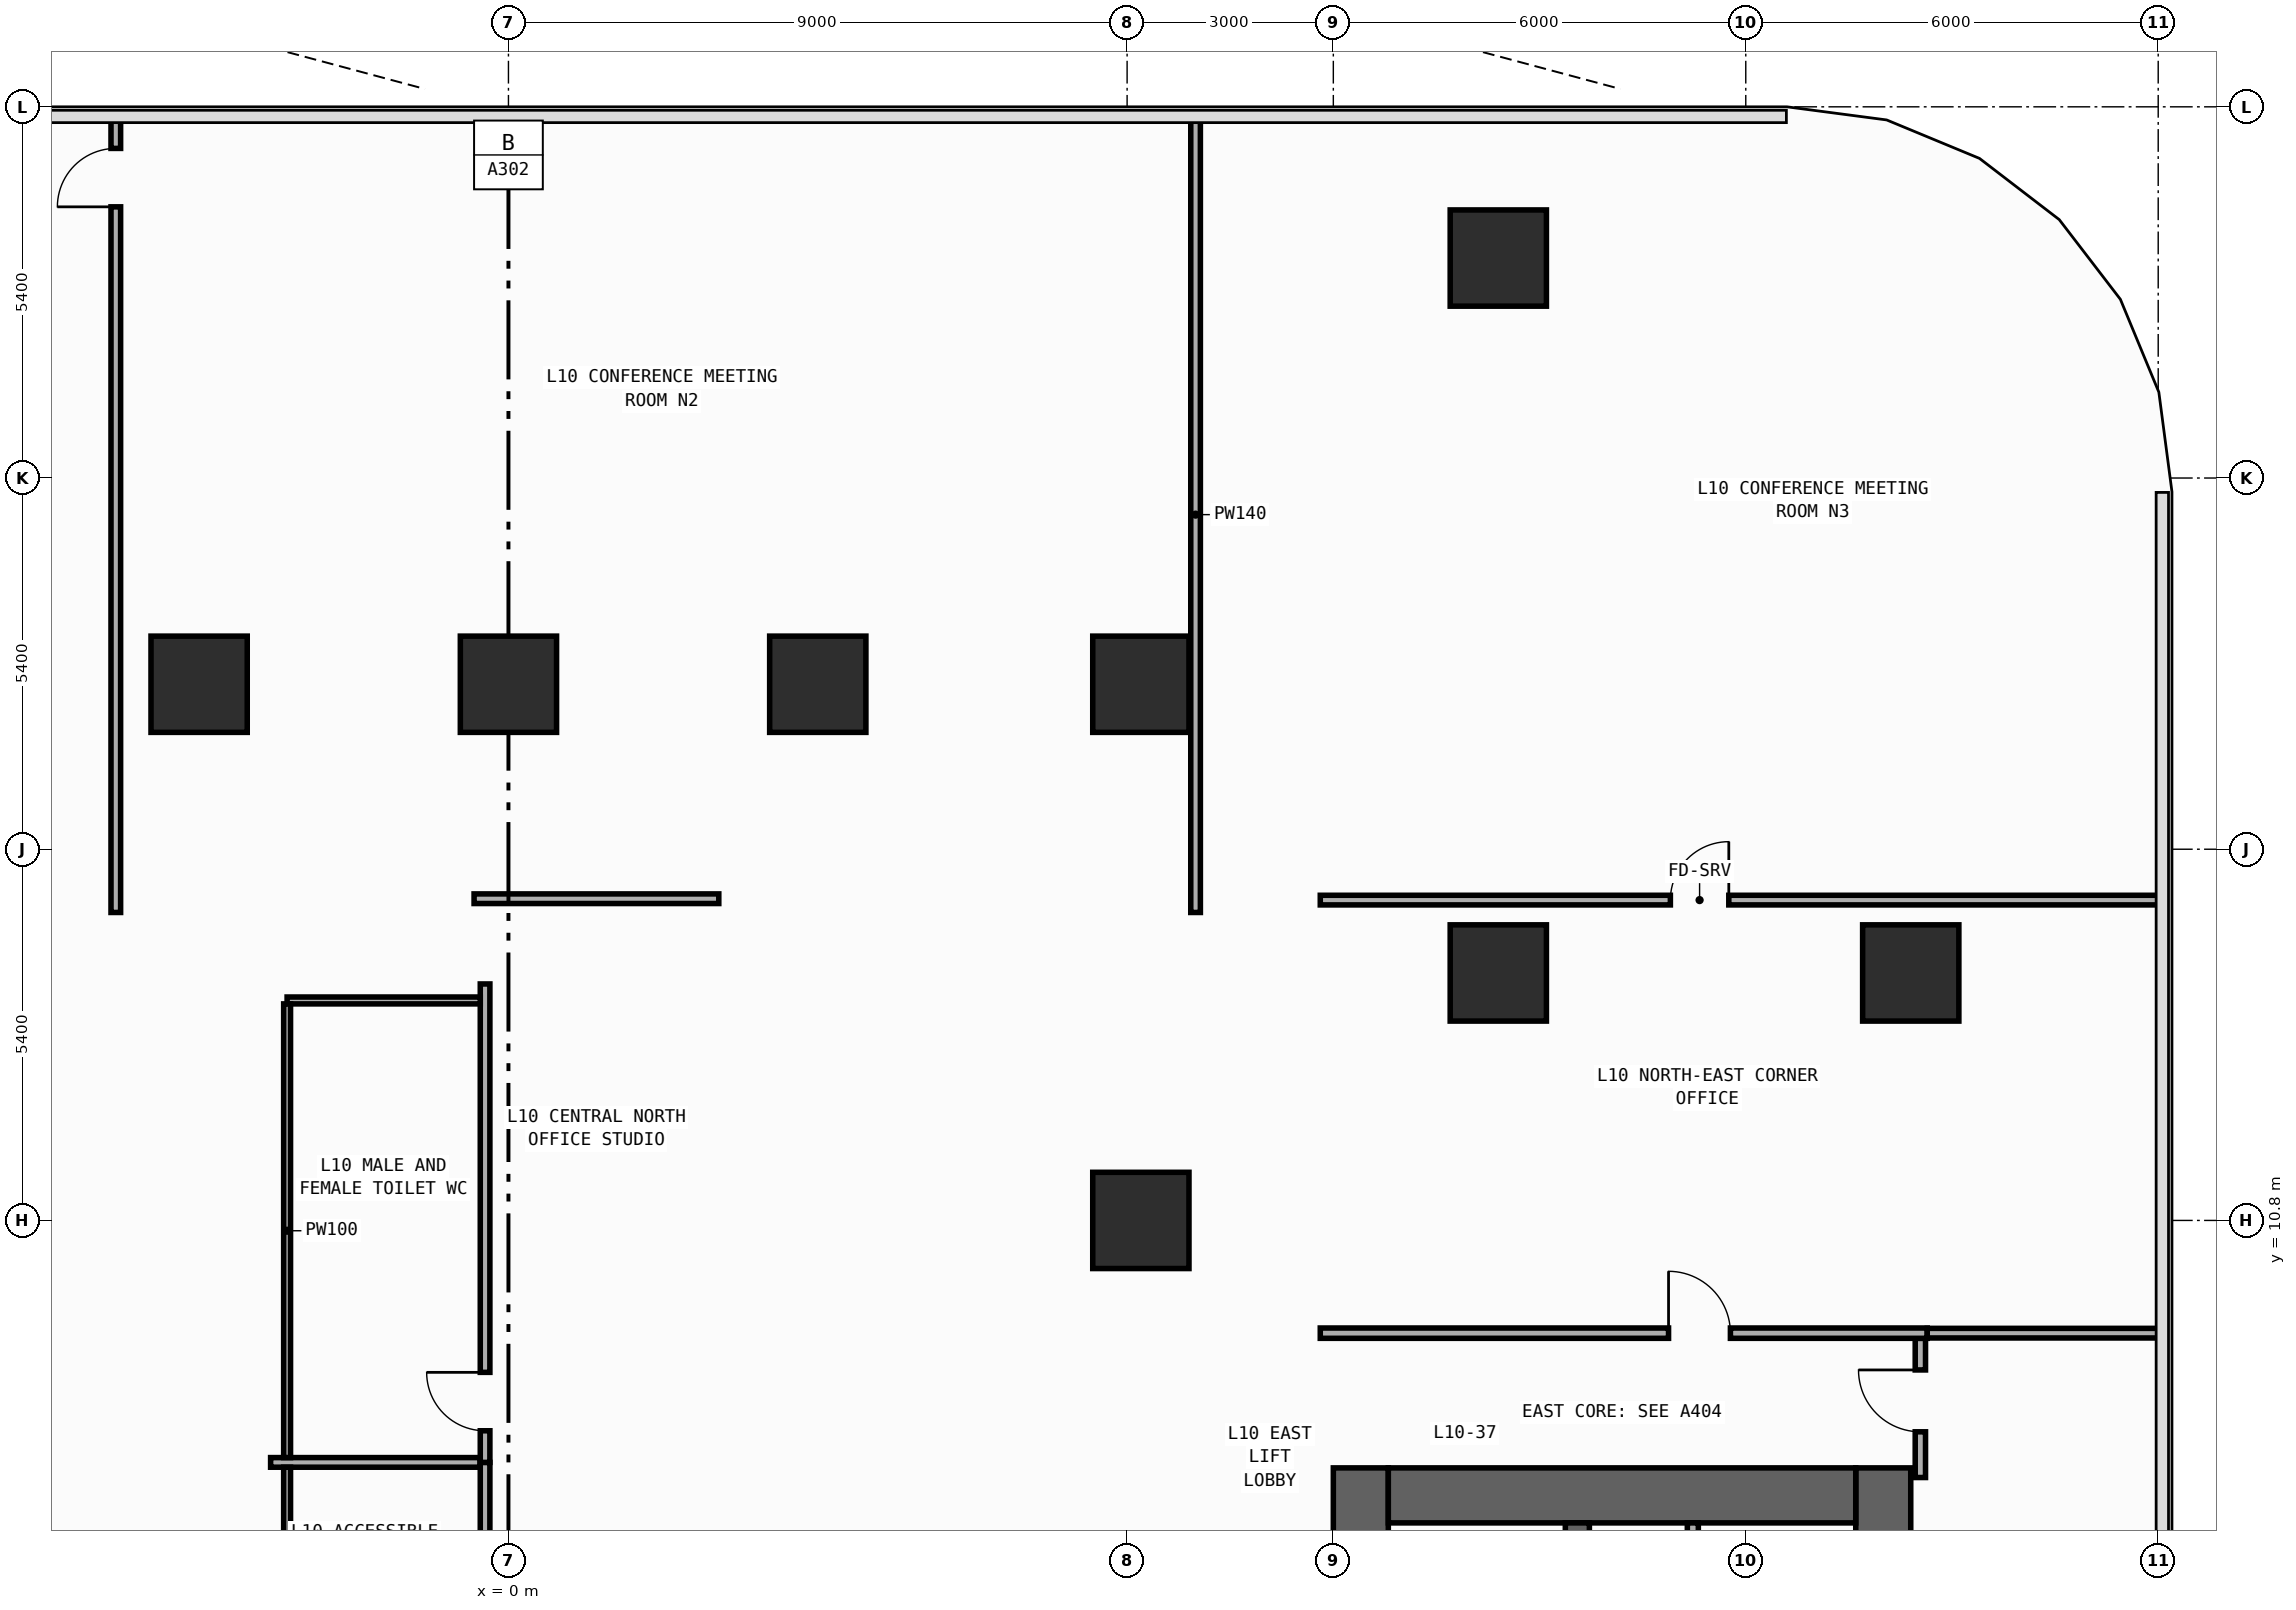
"""IFC4 building model, lengths in metres.
Left out: names, types, materials, properties, quantities, classifications, styles, units other than length and angle.
Written with IfcOpenShell. Run it as: python <this file> out.ifc"""

import sys

from ifc_helpers import new_model, si_unit, direction, frame, frame_2d, origin, origin_2d, place, context, subcontext, project, spatial, rectangle, extrude, element, fill, save


model = new_model("IFC4")
c1 = context("Model", 3, precision=1e-05, world=origin(), true_north=direction((0.0, 1.0)))
c2 = subcontext(c1, "Body", "Model", "MODEL_VIEW")
j1 = project(units=[si_unit("LENGTHUNIT", "METRE"), si_unit("PLANEANGLEUNIT", "RADIAN")], contexts=[c1])
p1 = place(None, origin())
s1 = spatial("IfcSite", under=j1, at=p1, CompositionType="ELEMENT")
p2 = place(p1, origin())
s2 = spatial("IfcBuilding", under=s1, at=p2, CompositionType="ELEMENT")
p3 = place(p2, frame((0.0, 0.0, 42.8)))
s3 = spatial("IfcBuildingStorey", under=s2, at=p3, CompositionType="ELEMENT", Elevation=42.8)
p4 = place(p3, frame((12.4, -19.8, 0.0), z_axis=(0.0, 0.0, 1.0), x_axis=(0.0, 1.0, 0.0)))
e1 = element("IfcWall", 1, at=p4, inside=s3, PredefinedType="SHEAR", context=c2, shape_type="SweptSolid", body=[
    extrude(rectangle(XDim=27.0, YDim=0.8, at=frame_2d((13.5, 0.0))), origin(), (0.0, 0.0, 1.0), 3.94),
])
p5 = place(p4, frame((23.05, 0.0, 0.0)))
e2 = element("IfcOpeningElement", 2, at=p5, cuts=e1, PredefinedType="OPENING", context=c2, shape_type="SweptSolid", body=[
    extrude(rectangle(XDim=1.1, YDim=2.2, at=frame_2d((0.55, 1.1))), frame((0.0, 0.41, 0.0), z_axis=(0.0, -1.0, 0.0), x_axis=(1.0, 0.0, 0.0)), (0.0, 0.0, 1.0), 0.82),
])
p6 = place(p4, frame((19.85, 0.0, 0.0)))
e3 = element("IfcOpeningElement", 3, at=p6, cuts=e1, PredefinedType="OPENING", context=c2, shape_type="SweptSolid", body=[
    extrude(rectangle(XDim=1.1, YDim=2.2, at=frame_2d((0.55, 1.1))), frame((0.0, 0.41, 0.0), z_axis=(0.0, -1.0, 0.0), x_axis=(1.0, 0.0, 0.0)), (0.0, 0.0, 1.0), 0.82),
])
p7 = place(p4, frame((16.65, 0.0, 0.0)))
e4 = element("IfcOpeningElement", 4, at=p7, cuts=e1, PredefinedType="OPENING", context=c2, shape_type="SweptSolid", body=[
    extrude(rectangle(XDim=1.1, YDim=2.2, at=frame_2d((0.55, 1.1))), frame((0.0, 0.41, 0.0), z_axis=(0.0, -1.0, 0.0), x_axis=(1.0, 0.0, 0.0)), (0.0, 0.0, 1.0), 0.82),
])
p8 = place(p4, frame((6.275, 0.0, 0.0)))
e5 = element("IfcOpeningElement", 5, at=p8, cuts=e1, PredefinedType="OPENING", context=c2, shape_type="SweptSolid", body=[
    extrude(rectangle(XDim=0.85, YDim=2.1, at=frame_2d((0.425, 1.05))), frame((0.0, 0.41, 0.0), z_axis=(0.0, -1.0, 0.0), x_axis=(1.0, 0.0, 0.0)), (0.0, 0.0, 1.0), 0.82),
])
p9 = place(p4, frame((8.575, 0.0, 0.0)))
e6 = element("IfcOpeningElement", 6, at=p9, cuts=e1, PredefinedType="OPENING", context=c2, shape_type="SweptSolid", body=[
    extrude(rectangle(XDim=0.85, YDim=2.1, at=frame_2d((0.425, 1.05))), frame((0.0, 0.41, 0.0), z_axis=(0.0, -1.0, 0.0), x_axis=(1.0, 0.0, 0.0)), (0.0, 0.0, 1.0), 0.82),
])
p10 = place(p4, frame((10.675, 0.0, 0.0)))
e7 = element("IfcOpeningElement", 7, at=p10, cuts=e1, PredefinedType="OPENING", context=c2, shape_type="SweptSolid", body=[
    extrude(rectangle(XDim=0.85, YDim=2.1, at=frame_2d((0.425, 1.05))), frame((0.0, 0.41, 0.0), z_axis=(0.0, -1.0, 0.0), x_axis=(1.0, 0.0, 0.0)), (0.0, 0.0, 1.0), 0.82),
])
p11 = place(p4, frame((12.725, 0.0, 0.0)))
e8 = element("IfcOpeningElement", 8, at=p11, cuts=e1, PredefinedType="OPENING", context=c2, shape_type="SweptSolid", body=[
    extrude(rectangle(XDim=1.15, YDim=2.2, at=frame_2d((0.575, 1.1))), frame((0.0, 0.41, 0.0), z_axis=(0.0, -1.0, 0.0), x_axis=(1.0, 0.0, 0.0)), (0.0, 0.0, 1.0), 0.82),
])
p12 = place(p4, frame((25.125, 0.0, 0.0)))
e9 = element("IfcOpeningElement", 9, at=p12, cuts=e1, PredefinedType="OPENING", context=c2, shape_type="SweptSolid", body=[
    extrude(rectangle(XDim=0.85, YDim=2.1, at=frame_2d((0.425, 1.05))), frame((0.0, 0.41, 0.0), z_axis=(0.0, -1.0, 0.0), x_axis=(1.0, 0.0, 0.0)), (0.0, 0.0, 1.0), 0.82),
])
p13 = place(p3, frame((20.0, -19.8, 0.0), z_axis=(0.0, 0.0, 1.0), x_axis=(0.0, 1.0, 0.0)))
e10 = element("IfcWall", 10, at=p13, inside=s3, PredefinedType="SHEAR", context=c2, shape_type="SweptSolid", body=[
    extrude(rectangle(XDim=27.0, YDim=0.8, at=frame_2d((13.5, 0.0))), origin(), (0.0, 0.0, 1.0), 3.94),
])
p14 = place(p3, frame((12.8, 6.8, 0.0), z_axis=(0.0, 0.0, 1.0), x_axis=(1.0, 0.0, 0.0)))
e11 = element("IfcWall", 11, at=p14, inside=s3, PredefinedType="SHEAR", context=c2, shape_type="SweptSolid", body=[
    extrude(rectangle(XDim=6.8, YDim=0.8, at=frame_2d((3.4, 0.0))), origin(), (0.0, 0.0, 1.0), 3.94),
])
p15 = place(p3, frame((15.55, -19.0, 0.0), z_axis=(0.0, 0.0, 1.0), x_axis=(0.0, 1.0, 0.0)))
e12 = element("IfcWall", 12, at=p15, inside=s3, PredefinedType="SHEAR", context=c2, shape_type="SweptSolid", body=[
    extrude(rectangle(XDim=25.4, YDim=0.35, at=frame_2d((12.7, 0.0))), origin(), (0.0, 0.0, 1.0), 3.94),
])
p16 = place(p15, frame((11.925, 0.0, 0.0)))
e13 = element("IfcOpeningElement", 13, at=p16, cuts=e12, PredefinedType="OPENING", context=c2, shape_type="SweptSolid", body=[
    extrude(rectangle(XDim=1.15, YDim=2.2, at=frame_2d((0.575, 1.1))), frame((0.0, 0.185, 0.0), z_axis=(0.0, -1.0, 0.0), x_axis=(1.0, 0.0, 0.0)), (0.0, 0.0, 1.0), 0.37),
])
p17 = place(p15, frame((24.325, 0.0, 0.0)))
e14 = element("IfcOpeningElement", 14, at=p17, cuts=e12, PredefinedType="OPENING", context=c2, shape_type="SweptSolid", body=[
    extrude(rectangle(XDim=0.85, YDim=2.1, at=frame_2d((0.425, 1.05))), frame((0.0, 0.185, 0.0), z_axis=(0.0, -1.0, 0.0), x_axis=(1.0, 0.0, 0.0)), (0.0, 0.0, 1.0), 0.37),
])
for number, where, z_axis, x_axis in (
    (15, (9.2, 10.8, 0.0), (0.0, 0.0, 1.0), (1.0, 0.0, 0.0)),
    (16, (9.2, 18.6, 0.0), (0.0, 0.0, 1.0), (1.0, 0.0, 0.0)),
    (17, (20.4, 14.4, 0.0), (0.0, 0.0, 1.0), (1.0, 0.0, 0.0)),
    (18, (14.4, 14.4, 0.0), (0.0, 0.0, 1.0), (1.0, 0.0, 0.0)),
    (19, (-4.5, 18.6, 0.0), (0.0, 0.0, 1.0), (1.0, 0.0, 0.0)),
    (20, (0.0, 18.6, 0.0), (0.0, 0.0, 1.0), (1.0, 0.0, 0.0)),
    (21, (4.5, 18.6, 0.0), (0.0, 0.0, 1.0), (1.0, 0.0, 0.0)),
    (22, (14.4, 24.8, 0.0), (0.0, 0.0, 1.0), (1.0, 0.0, 0.0)),
):
    element("IfcColumn", number, at=place(p3, frame(where, z_axis=z_axis, x_axis=x_axis)), inside=s3, PredefinedType="COLUMN", context=c2, shape_type="SweptSolid", body=[
        extrude(rectangle(XDim=1.4, YDim=1.4, at=origin_2d()), origin(), (0.0, 0.0, 1.0), 4.2),
    ])
p18 = place(p3, frame((17.23, 4.17, 0.0), z_axis=(0.0, 0.0, 1.0), x_axis=(0.0, 1.0, 0.0)))
e23 = element("IfcWall", 23, at=p18, inside=s3, PredefinedType="PARTITIONING", context=c2, shape_type="SweptSolid", body=[
    extrude(rectangle(XDim=2.23, YDim=0.16, at=frame_2d((1.115, 0.0))), origin(), (0.0, 0.0, 1.0), 3.94),
])
p19 = place(p18, frame((0.46, 0.0, 0.0)))
e24 = element("IfcOpeningElement", 24, at=p19, cuts=e23, PredefinedType="OPENING", context=c2, shape_type="SweptSolid", body=[
    extrude(rectangle(XDim=0.85, YDim=2.1, at=frame_2d((0.425, 1.05))), frame((0.0, 0.09, 0.0), z_axis=(0.0, -1.0, 0.0), x_axis=(1.0, 0.0, 0.0)), (0.0, 0.0, 1.0), 0.18),
])
p20 = place(p3, frame((20.54, 7.06, 0.0), z_axis=(0.0, 0.0, 1.0), x_axis=(0.0, 1.0, 0.0)))
e25 = element("IfcWall", 25, at=p20, inside=s3, PredefinedType="PARTITIONING", context=c2, shape_type="SweptSolid", body=[
    extrude(rectangle(XDim=2.025, YDim=0.15, at=frame_2d((1.012, 0.0))), origin(), (0.0, 0.0, 1.0), 3.94),
])
p21 = place(p20, frame((0.665, 0.0, 0.0)))
e26 = element("IfcOpeningElement", 26, at=p21, cuts=e25, PredefinedType="OPENING", context=c2, shape_type="SweptSolid", body=[
    extrude(rectangle(XDim=0.9, YDim=2.15, at=frame_2d((0.45, 1.075))), frame((0.0, 0.085, 0.0), z_axis=(0.0, -1.0, 0.0), x_axis=(1.0, 0.0, 0.0)), (0.0, 0.0, 1.0), 0.17),
])
p22 = place(p3, frame((11.81, 9.16, 0.0), z_axis=(0.0, 0.0, 1.0), x_axis=(1.0, 0.0, 0.0)))
e27 = element("IfcWall", 27, at=p22, inside=s3, PredefinedType="PARTITIONING", context=c2, shape_type="SweptSolid", body=[
    extrude(rectangle(XDim=8.83, YDim=0.15, at=frame_2d((4.415, 0.0))), origin(), (0.0, 0.0, 1.0), 3.94),
])
p23 = place(p22, frame((5.067, 0.0, 0.0)))
e28 = element("IfcOpeningElement", 28, at=p23, cuts=e27, PredefinedType="OPENING", context=c2, shape_type="SweptSolid", body=[
    extrude(rectangle(XDim=0.9, YDim=2.15, at=frame_2d((0.45, 1.075))), frame((0.0, 0.085, 0.0), z_axis=(0.0, -1.0, 0.0), x_axis=(1.0, 0.0, 0.0)), (0.0, 0.0, 1.0), 0.17),
])
p24 = place(p3, frame((20.64, 9.16, 0.0), z_axis=(0.0, 0.0, 1.0), x_axis=(1.0, 0.0, 0.0)))
e29 = element("IfcWall", 29, at=p24, inside=s3, PredefinedType="PARTITIONING", context=c2, shape_type="SweptSolid", body=[
    extrude(rectangle(XDim=3.415, YDim=0.14, at=frame_2d((1.708, 0.0))), origin(), (0.0, 0.0, 1.0), 3.94),
])
p25 = place(p3, frame((11.81, 15.46, 0.0), z_axis=(0.0, 0.0, 1.0), x_axis=(1.0, 0.0, 0.0)))
e30 = element("IfcWall", 30, at=p25, inside=s3, PredefinedType="PARTITIONING", context=c2, shape_type="SweptSolid", body=[
    extrude(rectangle(XDim=12.245, YDim=0.14, at=frame_2d((6.123, 0.0))), origin(), (0.0, 0.0, 1.0), 3.94),
])
p26 = place(p25, frame((5.093, 0.0, 0.0)))
e31 = element("IfcOpeningElement", 31, at=p26, cuts=e30, PredefinedType="OPENING", context=c2, shape_type="SweptSolid", body=[
    extrude(rectangle(XDim=0.85, YDim=2.1, at=frame_2d((0.425, 1.05))), frame((0.0, 0.08, 0.0), z_axis=(0.0, -1.0, 0.0), x_axis=(1.0, 0.0, 0.0)), (0.0, 0.0, 1.0), 0.16),
])
p27 = place(p3, frame((-5.712, 15.28, 0.0), z_axis=(0.0, 0.0, 1.0), x_axis=(0.0, 1.0, 0.0)))
e32 = element("IfcWall", 32, at=p27, inside=s3, PredefinedType="PARTITIONING", context=c2, shape_type="SweptSolid", body=[
    extrude(rectangle(XDim=11.575, YDim=0.14, at=frame_2d((5.788, 0.0))), origin(), (0.0, 0.0, 1.0), 3.94),
])
p28 = place(p27, frame((10.265, 0.0, 0.0)))
e33 = element("IfcOpeningElement", 33, at=p28, cuts=e32, PredefinedType="OPENING", context=c2, shape_type="SweptSolid", body=[
    extrude(rectangle(XDim=0.85, YDim=2.1, at=frame_2d((0.425, 1.05))), frame((0.0, 0.08, 0.0), z_axis=(0.0, -1.0, 0.0), x_axis=(1.0, 0.0, 0.0)), (0.0, 0.0, 1.0), 0.16),
])
p29 = place(p3, frame((9.996, 15.28, 0.0), z_axis=(0.0, 0.0, 1.0), x_axis=(0.0, 1.0, 0.0)))
e34 = element("IfcWall", 34, at=p29, inside=s3, PredefinedType="PARTITIONING", context=c2, shape_type="SweptSolid", body=[
    extrude(rectangle(XDim=11.575, YDim=0.14, at=frame_2d((5.788, 0.0))), origin(), (0.0, 0.0, 1.0), 3.94),
])
p30 = place(p3, frame((-0.5, 15.48, 0.0), z_axis=(0.0, 0.0, 1.0), x_axis=(1.0, 0.0, 0.0)))
e35 = element("IfcWall", 35, at=p30, inside=s3, PredefinedType="PARTITIONING", context=c2, shape_type="SweptSolid", body=[
    extrude(rectangle(XDim=3.56, YDim=0.14, at=frame_2d((1.78, 0.0))), origin(), (0.0, 0.0, 1.0), 3.94),
])
p31 = place(p3, frame((-3.46, 7.28, 0.0), z_axis=(0.0, 0.0, 1.0), x_axis=(1.0, 0.0, 0.0)))
e36 = element("IfcWall", 36, at=p31, inside=s3, PredefinedType="PARTITIONING", context=c2, shape_type="SweptSolid", body=[
    extrude(rectangle(XDim=3.05, YDim=0.14, at=frame_2d((1.525, 0.0))), origin(), (0.0, 0.0, 1.0), 3.94),
])
p32 = place(p3, frame((-0.34, 3.98, 0.0), z_axis=(0.0, 0.0, 1.0), x_axis=(0.0, 1.0, 0.0)))
e37 = element("IfcWall", 37, at=p32, inside=s3, PredefinedType="PARTITIONING", context=c2, shape_type="SweptSolid", body=[
    extrude(rectangle(XDim=3.3, YDim=0.14, at=frame_2d((1.65, 0.0))), origin(), (0.0, 0.0, 1.0), 3.94),
])
p33 = place(p3, frame((-0.34, 7.28, 0.0), z_axis=(0.0, 0.0, 1.0), x_axis=(0.0, 1.0, 0.0)))
e38 = element("IfcWall", 38, at=p33, inside=s3, PredefinedType="PARTITIONING", context=c2, shape_type="SweptSolid", body=[
    extrude(rectangle(XDim=6.96, YDim=0.14, at=frame_2d((3.48, 0.0))), origin(), (0.0, 0.0, 1.0), 3.94),
])
p34 = place(p33, frame((0.46, 0.0, 0.0)))
e39 = element("IfcOpeningElement", 39, at=p34, cuts=e38, PredefinedType="OPENING", context=c2, shape_type="SweptSolid", body=[
    extrude(rectangle(XDim=0.85, YDim=2.1, at=frame_2d((0.425, 1.05))), frame((0.0, 0.08, 0.0), z_axis=(0.0, -1.0, 0.0), x_axis=(1.0, 0.0, 0.0)), (0.0, 0.0, 1.0), 0.16),
])
p35 = place(p3, frame((-3.22, 3.98, 0.0), z_axis=(0.0, 0.0, 1.0), x_axis=(0.0, 1.0, 0.0)))
e40 = element("IfcWall", 40, at=p35, inside=s3, PredefinedType="PARTITIONING", context=c2, shape_type="SweptSolid", body=[
    extrude(rectangle(XDim=3.23, YDim=0.1, at=frame_2d((1.615, 0.0))), origin(), (0.0, 0.0, 1.0), 3.94),
])
p36 = place(p3, frame((-3.22, 14.0, 0.0), z_axis=(0.0, 0.0, 1.0), x_axis=(1.0, 0.0, 0.0)))
e41 = element("IfcWall", 41, at=p36, inside=s3, PredefinedType="PARTITIONING", context=c2, shape_type="SweptSolid", body=[
    extrude(rectangle(XDim=2.81, YDim=0.1, at=frame_2d((1.405, 0.0))), origin(), (0.0, 0.0, 1.0), 3.94),
])
p37 = place(p3, frame((-3.22, 7.35, 0.0), z_axis=(0.0, 0.0, 1.0), x_axis=(0.0, 1.0, 0.0)))
e42 = element("IfcWall", 42, at=p37, inside=s3, PredefinedType="PARTITIONING", context=c2, shape_type="SweptSolid", body=[
    extrude(rectangle(XDim=6.6, YDim=0.1, at=frame_2d((3.3, 0.0))), origin(), (0.0, 0.0, 1.0), 3.94),
])
p38 = place(p21, origin())
e43 = element("IfcDoor", 43, at=p38, inside=s3, OperationType="SINGLE_SWING_RIGHT", PredefinedType="DOOR", context=c2, shape_type="SweptSolid", body=[
    extrude(rectangle(XDim=0.9, YDim=2.15, at=frame_2d((0.45, 1.075))), frame((0.0, 0.025, 0.0), z_axis=(0.0, -1.0, 0.0), x_axis=(1.0, 0.0, 0.0)), (0.0, 0.0, 1.0), 0.05),
])
fill(e26, e43)
p39 = place(p23, origin())
e44 = element("IfcDoor", 44, at=p39, inside=s3, OperationType="SINGLE_SWING_LEFT", PredefinedType="DOOR", context=c2, shape_type="SweptSolid", body=[
    extrude(rectangle(XDim=0.9, YDim=2.15, at=frame_2d((0.45, 1.075))), frame((0.0, 0.025, 0.0), z_axis=(0.0, -1.0, 0.0), x_axis=(1.0, 0.0, 0.0)), (0.0, 0.0, 1.0), 0.05),
])
fill(e28, e44)
p40 = place(p26, origin())
e45 = element("IfcDoor", 45, at=p40, inside=s3, OperationType="SINGLE_SWING_RIGHT", PredefinedType="DOOR", context=c2, shape_type="SweptSolid", body=[
    extrude(rectangle(XDim=0.85, YDim=2.1, at=frame_2d((0.425, 1.05))), frame((0.0, 0.025, 0.0), z_axis=(0.0, -1.0, 0.0), x_axis=(1.0, 0.0, 0.0)), (0.0, 0.0, 1.0), 0.05),
])
fill(e31, e45)
p41 = place(p28, origin())
e46 = element("IfcDoor", 46, at=p41, inside=s3, OperationType="SINGLE_SWING_LEFT", PredefinedType="DOOR", context=c2, shape_type="SweptSolid", body=[
    extrude(rectangle(XDim=0.85, YDim=2.1, at=frame_2d((0.425, 1.05))), frame((0.0, 0.025, 0.0), z_axis=(0.0, -1.0, 0.0), x_axis=(1.0, 0.0, 0.0)), (0.0, 0.0, 1.0), 0.05),
])
fill(e33, e46)
p42 = place(p34, origin())
e47 = element("IfcDoor", 47, at=p42, inside=s3, OperationType="SINGLE_SWING_RIGHT", PredefinedType="DOOR", context=c2, shape_type="SweptSolid", body=[
    extrude(rectangle(XDim=0.85, YDim=2.1, at=frame_2d((0.425, 1.05))), frame((0.0, 0.025, 0.0), z_axis=(0.0, -1.0, 0.0), x_axis=(1.0, 0.0, 0.0)), (0.0, 0.0, 1.0), 0.05),
])
fill(e39, e47)
save(model, sys.argv[1])
